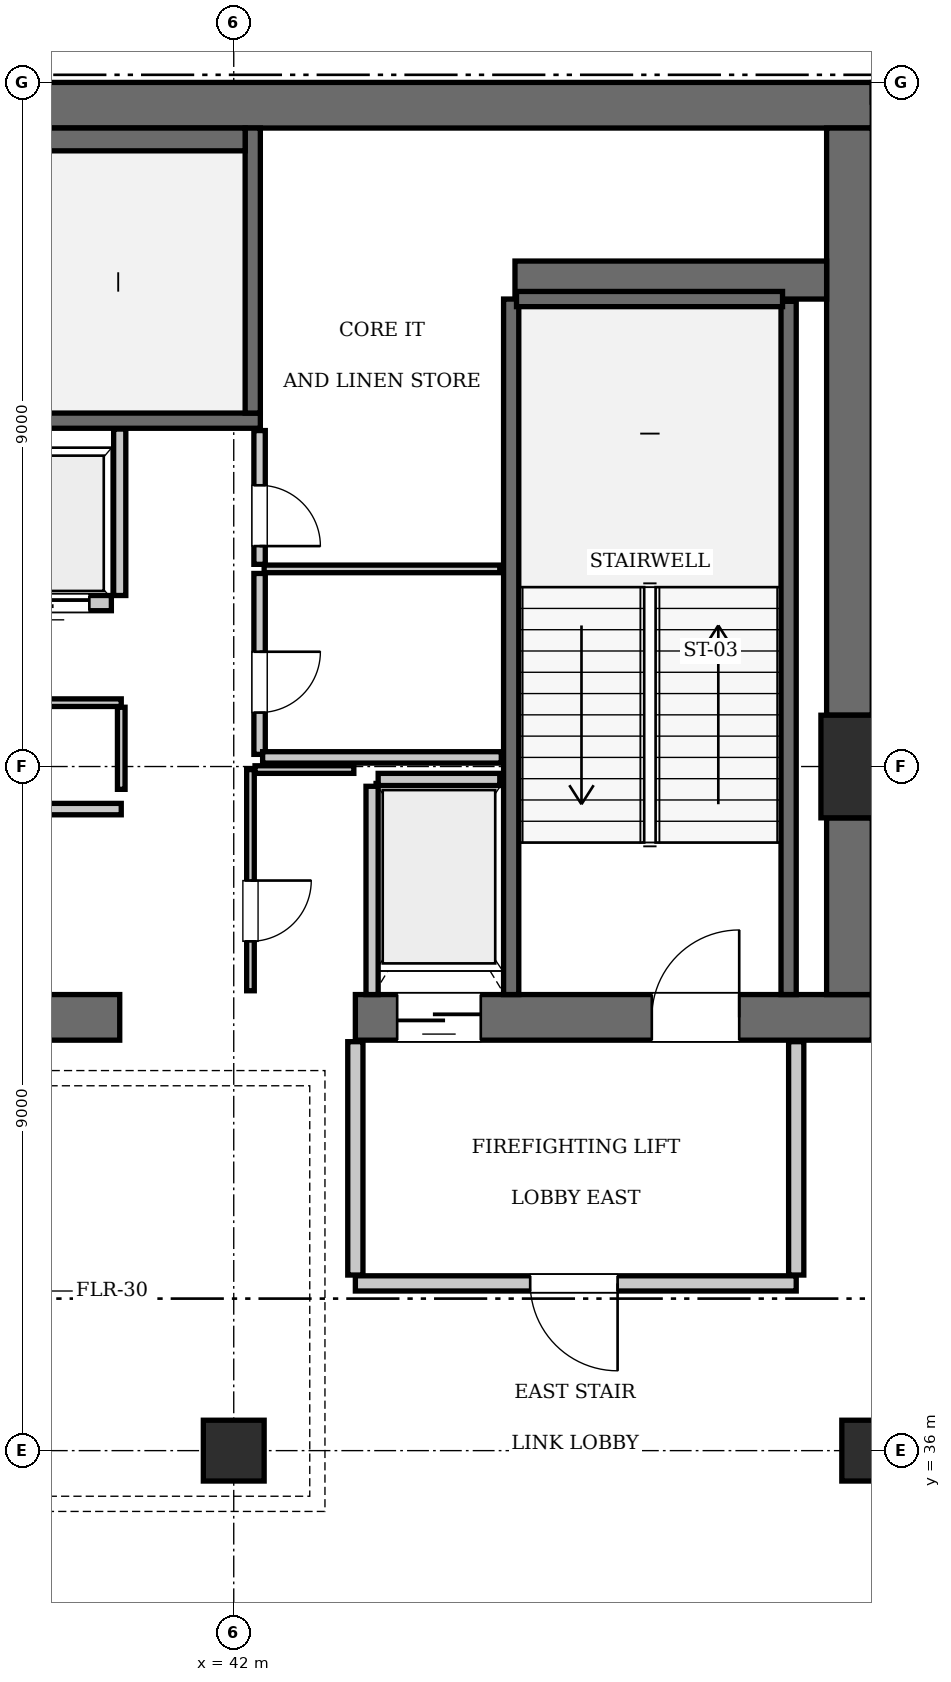
"""IFC4 building model, lengths in metres.
Left out: names, types, materials, properties, quantities, classifications, styles, units other than length and angle.
Written with IfcOpenShell. Run it as: python <this file> out.ifc"""

import sys

from ifc_helpers import new_model, si_unit, direction, frame, frame_2d, origin, origin_2d, place, context, subcontext, project, spatial, rectangle, extrude, element, fill, save


model = new_model("IFC4")
c1 = context("Model", 3, precision=1e-05, world=origin(), true_north=direction((0.0, 1.0)))
c2 = subcontext(c1, "Body", "Model", "MODEL_VIEW")
j1 = project(units=[si_unit("LENGTHUNIT", "METRE"), si_unit("PLANEANGLEUNIT", "RADIAN")], contexts=[c1])
p1 = place(None, origin())
s1 = spatial("IfcSite", under=j1, at=p1, CompositionType="ELEMENT")
p2 = place(p1, origin())
s2 = spatial("IfcBuilding", under=s1, at=p2, CompositionType="ELEMENT")
p3 = place(p2, frame((0.0, 0.0, 349.65)))
s3 = spatial("IfcBuildingStorey", under=s2, at=p3, CompositionType="ELEMENT", Elevation=349.65)
p4 = place(p3, frame((50.4, 45.0, 0.0), z_axis=(0.0, 0.0, 1.0), x_axis=(1.0, 0.0, 0.0)))
e1 = element("IfcColumn", 1, at=p4, inside=s3, PredefinedType="COLUMN", context=c2, shape_type="SweptSolid", body=[
    extrude(rectangle(XDim=1.35, YDim=1.35, at=origin_2d()), origin(), (0.0, 0.0, 1.0), 4.55),
])
p5 = place(p3, frame((25.2, 53.7, 0.0), z_axis=(0.0, 0.0, 1.0), x_axis=(1.0, 0.0, 0.0)))
e2 = element("IfcWall", 2, at=p5, inside=s3, PredefinedType="SHEAR", context=c2, shape_type="SweptSolid", body=[
    extrude(rectangle(XDim=25.2, YDim=0.6, at=frame_2d((12.6, 0.0))), origin(), (0.0, 0.0, 1.0), 4.55),
])
p6 = place(p3, frame((35.1, 41.7, 0.0), z_axis=(0.0, 0.0, 1.0), x_axis=(1.0, 0.0, 0.0)))
e3 = element("IfcWall", 3, at=p6, inside=s3, PredefinedType="SHEAR", context=c2, shape_type="SweptSolid", body=[
    extrude(rectangle(XDim=5.4, YDim=0.6, at=frame_2d((2.7, 0.0))), origin(), (0.0, 0.0, 1.0), 4.55),
])
p7 = place(p3, frame((43.6, 41.7, 0.0), z_axis=(0.0, 0.0, 1.0), x_axis=(1.0, 0.0, 0.0)))
e4 = element("IfcWall", 4, at=p7, inside=s3, PredefinedType="SHEAR", context=c2, shape_type="SweptSolid", body=[
    extrude(rectangle(XDim=6.8, YDim=0.6, at=frame_2d((3.4, 0.0))), origin(), (0.0, 0.0, 1.0), 4.55),
])
p8 = place(p7, frame((3.9, 0.0, 0.0)))
e5 = element("IfcOpeningElement", 5, at=p8, cuts=e4, PredefinedType="OPENING", context=c2, shape_type="SweptSolid", body=[
    extrude(rectangle(XDim=1.15, YDim=2.15, at=frame_2d((0.575, 1.075))), frame((0.0, 0.31, 0.0), z_axis=(0.0, -1.0, 0.0), x_axis=(1.0, 0.0, 0.0)), (0.0, 0.0, 1.0), 0.62),
])
p9 = place(p7, frame((0.55, 0.0, 0.0)))
e6 = element("IfcOpeningElement", 6, at=p9, cuts=e4, PredefinedType="OPENING", context=c2, shape_type="SweptSolid", body=[
    extrude(rectangle(XDim=1.1, YDim=2.2, at=frame_2d((0.55, 1.1))), frame((0.0, 0.31, 0.0), z_axis=(0.0, -1.0, 0.0), x_axis=(1.0, 0.0, 0.0)), (0.0, 0.0, 1.0), 0.62),
])
p10 = place(p3, frame((50.1, 42.0, 0.0), z_axis=(0.0, 0.0, 1.0), x_axis=(0.0, 1.0, 0.0)))
e7 = element("IfcWall", 7, at=p10, inside=s3, PredefinedType="SHEAR", context=c2, shape_type="SweptSolid", body=[
    extrude(rectangle(XDim=2.325, YDim=0.6, at=frame_2d((1.163, 0.0))), origin(), (0.0, 0.0, 1.0), 4.55),
])
p11 = place(p3, frame((50.1, 45.675, 0.0), z_axis=(0.0, 0.0, 1.0), x_axis=(0.0, 1.0, 0.0)))
e8 = element("IfcWall", 8, at=p11, inside=s3, PredefinedType="SHEAR", context=c2, shape_type="SweptSolid", body=[
    extrude(rectangle(XDim=7.725, YDim=0.6, at=frame_2d((3.862, 0.0))), origin(), (0.0, 0.0, 1.0), 4.55),
])
p12 = place(p3, frame((45.7, 51.4, 0.0), z_axis=(0.0, 0.0, 1.0), x_axis=(1.0, 0.0, 0.0)))
e9 = element("IfcWall", 9, at=p12, inside=s3, PredefinedType="SHEAR", context=c2, shape_type="SweptSolid", body=[
    extrude(rectangle(XDim=4.1, YDim=0.5, at=frame_2d((2.05, 0.0))), origin(), (0.0, 0.0, 1.0), 4.55),
])
for number, where, z_axis, x_axis in (
    (10, (42.0, 36.0, 0.0), (0.0, 0.0, 1.0), (1.0, 0.0, 0.0)),
    (11, (50.4, 36.0, 0.0), (0.0, 0.0, 1.0), (1.0, 0.0, 0.0)),
):
    element("IfcColumn", number, at=place(p3, frame(where, z_axis=z_axis, x_axis=x_axis)), inside=s3, PredefinedType="COLUMN", context=c2, shape_type="SweptSolid", body=[
        extrude(rectangle(XDim=0.8, YDim=0.8, at=origin_2d()), origin(), (0.0, 0.0, 1.0), 4.55),
    ])
p13 = place(p3, frame((33.25, 49.55, 0.0), z_axis=(0.0, 0.0, 1.0), x_axis=(1.0, 0.0, 0.0)))
e12 = element("IfcWall", 12, at=p13, inside=s3, PredefinedType="SOLIDWALL", context=c2, shape_type="SweptSolid", body=[
    extrude(rectangle(XDim=9.1, YDim=0.2, at=frame_2d((4.55, 0.0))), origin(), (0.0, 0.0, 1.0), 4.29),
])
p14 = place(p3, frame((42.25, 49.65, 0.0), z_axis=(0.0, 0.0, 1.0), x_axis=(0.0, 1.0, 0.0)))
e13 = element("IfcWall", 13, at=p14, inside=s3, PredefinedType="SOLIDWALL", context=c2, shape_type="SweptSolid", body=[
    extrude(rectangle(XDim=3.75, YDim=0.2, at=frame_2d((1.875, 0.0))), origin(), (0.0, 0.0, 1.0), 4.29),
])
p15 = place(p3, frame((33.45, 53.25, 0.0), z_axis=(0.0, 0.0, 1.0), x_axis=(1.0, 0.0, 0.0)))
e14 = element("IfcWall", 14, at=p15, inside=s3, PredefinedType="SOLIDWALL", context=c2, shape_type="SweptSolid", body=[
    extrude(rectangle(XDim=8.7, YDim=0.3, at=frame_2d((4.35, 0.0))), origin(), (0.0, 0.0, 1.0), 4.29),
])
p16 = place(p3, frame((45.65, 42.0, 0.0), z_axis=(0.0, 0.0, 1.0), x_axis=(0.0, 1.0, 0.0)))
e15 = element("IfcWall", 15, at=p16, inside=s3, PredefinedType="SOLIDWALL", context=c2, shape_type="SweptSolid", body=[
    extrude(rectangle(XDim=9.15, YDim=0.2, at=frame_2d((4.575, 0.0))), origin(), (0.0, 0.0, 1.0), 4.29),
])
p17 = place(p3, frame((49.3, 42.0, 0.0), z_axis=(0.0, 0.0, 1.0), x_axis=(0.0, 1.0, 0.0)))
e16 = element("IfcWall", 16, at=p17, inside=s3, PredefinedType="SOLIDWALL", context=c2, shape_type="SweptSolid", body=[
    extrude(rectangle(XDim=9.12, YDim=0.2, at=frame_2d((4.56, 0.0))), origin(), (0.0, 0.0, 1.0), 4.29),
])
p18 = place(p3, frame((45.72, 51.15, 0.0), z_axis=(0.0, 0.0, 1.0), x_axis=(1.0, 0.0, 0.0)))
e17 = element("IfcWall", 17, at=p18, inside=s3, PredefinedType="SOLIDWALL", context=c2, shape_type="SweptSolid", body=[
    extrude(rectangle(XDim=3.5, YDim=0.2, at=frame_2d((1.75, 0.0))), origin(), (0.0, 0.0, 1.0), 4.29),
])
p19 = place(p3, frame((38.71, 47.15, 0.0), z_axis=(0.0, 0.0, 1.0), x_axis=(1.0, 0.0, 0.0)))
e18 = element("IfcWall", 18, at=p19, inside=s3, PredefinedType="SOLIDWALL", context=c2, shape_type="SweptSolid", body=[
    extrude(rectangle(XDim=1.68, YDim=0.2, at=frame_2d((0.84, 0.0))), origin(), (0.0, 0.0, 1.0), 4.29),
])
p20 = place(p19, frame((0.29, 0.0, 0.0)))
e19 = element("IfcOpeningElement", 19, at=p20, cuts=e18, PredefinedType="OPENING", context=c2, shape_type="SweptSolid", body=[
    extrude(rectangle(XDim=1.1, YDim=2.2, at=frame_2d((0.55, 1.1))), frame((0.0, 0.11, 0.0), z_axis=(0.0, -1.0, 0.0), x_axis=(1.0, 0.0, 0.0)), (0.0, 0.0, 1.0), 0.22),
])
p21 = place(p3, frame((43.9, 44.83, 0.0), z_axis=(0.0, 0.0, 1.0), x_axis=(1.0, 0.0, 0.0)))
e20 = element("IfcWall", 20, at=p21, inside=s3, PredefinedType="SOLIDWALL", context=c2, shape_type="SweptSolid", body=[
    extrude(rectangle(XDim=1.6, YDim=0.16, at=frame_2d((0.8, 0.0))), origin(), (0.0, 0.0, 1.0), 4.29),
])
p22 = place(p3, frame((43.82, 42.0, 0.0), z_axis=(0.0, 0.0, 1.0), x_axis=(0.0, 1.0, 0.0)))
e21 = element("IfcWall", 21, at=p22, inside=s3, PredefinedType="SOLIDWALL", context=c2, shape_type="SweptSolid", body=[
    extrude(rectangle(XDim=2.74, YDim=0.16, at=frame_2d((1.37, 0.0))), origin(), (0.0, 0.0, 1.0), 4.29),
])
p23 = place(p3, frame((40.5, 47.25, 0.0), z_axis=(0.0, 0.0, 1.0), x_axis=(0.0, 1.0, 0.0)))
e22 = element("IfcWall", 22, at=p23, inside=s3, PredefinedType="SOLIDWALL", context=c2, shape_type="SweptSolid", body=[
    extrude(rectangle(XDim=2.19, YDim=0.16, at=frame_2d((1.095, 0.0))), origin(), (0.0, 0.0, 1.0), 4.29),
])
p24 = place(p3, frame((43.6, 38.2, 0.0), z_axis=(0.0, 0.0, 1.0), x_axis=(1.0, 0.0, 0.0)))
e23 = element("IfcWall", 23, at=p24, inside=s3, PredefinedType="PARTITIONING", context=c2, shape_type="SweptSolid", body=[
    extrude(rectangle(XDim=5.8, YDim=0.2, at=frame_2d((2.9, 0.0))), origin(), (0.0, 0.0, 1.0), 4.29),
])
p25 = place(p24, frame((2.3, 0.0, 0.0)))
e24 = element("IfcOpeningElement", 24, at=p25, cuts=e23, PredefinedType="OPENING", context=c2, shape_type="SweptSolid", body=[
    extrude(rectangle(XDim=1.15, YDim=2.15, at=frame_2d((0.575, 1.075))), frame((0.0, 0.11, 0.0), z_axis=(0.0, -1.0, 0.0), x_axis=(1.0, 0.0, 0.0)), (0.0, 0.0, 1.0), 0.22),
])
for number, where, z_axis, x_axis in (
    (25, (43.6, 38.31, 0.0), (0.0, 0.0, 1.0), (0.0, 1.0, 0.0)),
    (26, (49.4, 38.31, 0.0), (0.0, 0.0, 1.0), (0.0, 1.0, 0.0)),
):
    element("IfcWall", number, at=place(p3, frame(where, z_axis=z_axis, x_axis=x_axis)), inside=s3, PredefinedType="PARTITIONING", context=c2, shape_type="SweptSolid", body=[
        extrude(rectangle(XDim=3.07, YDim=0.2, at=frame_2d((1.535, 0.0))), origin(), (0.0, 0.0, 1.0), 4.29),
    ])
p26 = place(p3, frame((38.02, 45.84, 0.0), z_axis=(0.0, 0.0, 1.0), x_axis=(1.0, 0.0, 0.0)))
e27 = element("IfcWall", 27, at=p26, inside=s3, PredefinedType="PARTITIONING", context=c2, shape_type="SweptSolid", body=[
    extrude(rectangle(XDim=2.5, YDim=0.1, at=frame_2d((1.25, 0.0))), origin(), (0.0, 0.0, 1.0), 4.29),
])
p27 = place(p26, frame((0.75, 0.0, 0.0)))
e28 = element("IfcOpeningElement", 28, at=p27, cuts=e27, PredefinedType="OPENING", context=c2, shape_type="SweptSolid", body=[
    extrude(rectangle(XDim=0.8, YDim=2.05, at=frame_2d((0.4, 1.025))), frame((0.0, 0.06, 0.0), z_axis=(0.0, -1.0, 0.0), x_axis=(1.0, 0.0, 0.0)), (0.0, 0.0, 1.0), 0.12),
])
p28 = place(p3, frame((40.52, 44.7, 0.0), z_axis=(0.0, 0.0, 1.0), x_axis=(0.0, 1.0, 0.0)))
e29 = element("IfcWall", 29, at=p28, inside=s3, PredefinedType="PARTITIONING", context=c2, shape_type="SweptSolid", body=[
    extrude(rectangle(XDim=1.08, YDim=0.1, at=frame_2d((0.54, 0.0))), origin(), (0.0, 0.0, 1.0), 4.29),
])
p29 = place(p3, frame((42.22, 42.05, 0.0), z_axis=(0.0, 0.0, 1.0), x_axis=(0.0, 1.0, 0.0)))
e30 = element("IfcWall", 30, at=p29, inside=s3, PredefinedType="PARTITIONING", context=c2, shape_type="SweptSolid", body=[
    extrude(rectangle(XDim=2.91, YDim=0.1, at=frame_2d((1.455, 0.0))), origin(), (0.0, 0.0, 1.0), 4.29),
])
p30 = place(p29, frame((0.65, 0.0, 0.0)))
e31 = element("IfcOpeningElement", 31, at=p30, cuts=e30, PredefinedType="OPENING", context=c2, shape_type="SweptSolid", body=[
    extrude(rectangle(XDim=0.8, YDim=2.05, at=frame_2d((0.4, 1.025))), frame((0.0, 0.06, 0.0), z_axis=(0.0, -1.0, 0.0), x_axis=(1.0, 0.0, 0.0)), (0.0, 0.0, 1.0), 0.12),
])
p31 = place(p3, frame((42.28, 44.96, 0.0), z_axis=(0.0, 0.0, 1.0), x_axis=(1.0, 0.0, 0.0)))
e32 = element("IfcWall", 32, at=p31, inside=s3, PredefinedType="PARTITIONING", context=c2, shape_type="SweptSolid", body=[
    extrude(rectangle(XDim=1.3, YDim=0.1, at=frame_2d((0.65, 0.0))), origin(), (0.0, 0.0, 1.0), 4.29),
])
p32 = place(p3, frame((35.56, 44.44, 0.0), z_axis=(0.0, 0.0, 1.0), x_axis=(1.0, 0.0, 0.0)))
e33 = element("IfcWall", 33, at=p32, inside=s3, PredefinedType="PARTITIONING", context=c2, shape_type="SweptSolid", body=[
    extrude(rectangle(XDim=4.96, YDim=0.15, at=frame_2d((2.48, 0.0))), origin(), (0.0, 0.0, 1.0), 4.29),
])
p33 = place(p32, frame((1.32, 0.0, 0.0)))
e34 = element("IfcOpeningElement", 34, at=p33, cuts=e33, PredefinedType="OPENING", context=c2, shape_type="SweptSolid", body=[
    extrude(rectangle(XDim=0.9, YDim=2.1, at=frame_2d((0.45, 1.05))), frame((0.0, 0.085, 0.0), z_axis=(0.0, -1.0, 0.0), x_axis=(1.0, 0.0, 0.0)), (0.0, 0.0, 1.0), 0.17),
])
p34 = place(p3, frame((42.34, 45.16, 0.0), z_axis=(0.0, 0.0, 1.0), x_axis=(0.0, 1.0, 0.0)))
e35 = element("IfcWall", 35, at=p34, inside=s3, PredefinedType="PARTITIONING", context=c2, shape_type="SweptSolid", body=[
    extrude(rectangle(XDim=2.38, YDim=0.15, at=frame_2d((1.19, 0.0))), origin(), (0.0, 0.0, 1.0), 4.29),
])
p35 = place(p34, frame((0.55, 0.0, 0.0)))
e36 = element("IfcOpeningElement", 36, at=p35, cuts=e35, PredefinedType="OPENING", context=c2, shape_type="SweptSolid", body=[
    extrude(rectangle(XDim=0.8, YDim=2.05, at=frame_2d((0.4, 1.025))), frame((0.0, 0.085, 0.0), z_axis=(0.0, -1.0, 0.0), x_axis=(1.0, 0.0, 0.0)), (0.0, 0.0, 1.0), 0.17),
])
p36 = place(p3, frame((42.34, 47.66, 0.0), z_axis=(0.0, 0.0, 1.0), x_axis=(0.0, 1.0, 0.0)))
e37 = element("IfcWall", 37, at=p36, inside=s3, PredefinedType="PARTITIONING", context=c2, shape_type="SweptSolid", body=[
    extrude(rectangle(XDim=1.76, YDim=0.15, at=frame_2d((0.88, 0.0))), origin(), (0.0, 0.0, 1.0), 4.29),
])
p37 = place(p36, frame((0.24, 0.0, 0.0)))
e38 = element("IfcOpeningElement", 38, at=p37, cuts=e37, PredefinedType="OPENING", context=c2, shape_type="SweptSolid", body=[
    extrude(rectangle(XDim=0.8, YDim=2.05, at=frame_2d((0.4, 1.025))), frame((0.0, 0.085, 0.0), z_axis=(0.0, -1.0, 0.0), x_axis=(1.0, 0.0, 0.0)), (0.0, 0.0, 1.0), 0.17),
])
p38 = place(p3, frame((42.4, 47.6, 0.0), z_axis=(0.0, 0.0, 1.0), x_axis=(1.0, 0.0, 0.0)))
e39 = element("IfcWall", 39, at=p38, inside=s3, PredefinedType="PARTITIONING", context=c2, shape_type="SweptSolid", body=[
    extrude(rectangle(XDim=3.1, YDim=0.1, at=frame_2d((1.55, 0.0))), origin(), (0.0, 0.0, 1.0), 4.29),
])
p39 = place(p3, frame((42.38, 45.12, 0.0), z_axis=(0.0, 0.0, 1.0), x_axis=(1.0, 0.0, 0.0)))
e40 = element("IfcWall", 40, at=p39, inside=s3, PredefinedType="PARTITIONING", context=c2, shape_type="SweptSolid", body=[
    extrude(rectangle(XDim=3.14, YDim=0.15, at=frame_2d((1.57, 0.0))), origin(), (0.0, 0.0, 1.0), 4.29),
])
p40 = place(p8, origin())
e41 = element("IfcDoor", 41, at=p40, inside=s3, OperationType="SINGLE_SWING_RIGHT", PredefinedType="DOOR", context=c2, shape_type="SweptSolid", body=[
    extrude(rectangle(XDim=1.15, YDim=2.15, at=frame_2d((0.575, 1.075))), frame((0.0, 0.025, 0.0), z_axis=(0.0, -1.0, 0.0), x_axis=(1.0, 0.0, 0.0)), (0.0, 0.0, 1.0), 0.05),
])
fill(e5, e41)
p41 = place(p20, frame((1.1, 0.0, 0.0), z_axis=(0.0, 0.0, 1.0), x_axis=(-1.0, 0.0, 0.0)))
e42 = element("IfcDoor", 42, at=p41, inside=s3, OperationType="SLIDING_TO_RIGHT", PredefinedType="DOOR", context=c2, shape_type="SweptSolid", body=[
    extrude(rectangle(XDim=1.1, YDim=2.2, at=frame_2d((0.55, 1.1))), frame((0.0, 0.025, 0.0), z_axis=(0.0, -1.0, 0.0), x_axis=(1.0, 0.0, 0.0)), (0.0, 0.0, 1.0), 0.05),
])
fill(e19, e42)
p42 = place(p9, frame((1.1, 0.0, 0.0), z_axis=(0.0, 0.0, 1.0), x_axis=(-1.0, 0.0, 0.0)))
e43 = element("IfcDoor", 43, at=p42, inside=s3, OperationType="SLIDING_TO_LEFT", PredefinedType="DOOR", context=c2, shape_type="SweptSolid", body=[
    extrude(rectangle(XDim=1.1, YDim=2.2, at=frame_2d((0.55, 1.1))), frame((0.0, 0.025, 0.0), z_axis=(0.0, -1.0, 0.0), x_axis=(1.0, 0.0, 0.0)), (0.0, 0.0, 1.0), 0.05),
])
fill(e6, e43)
p43 = place(p25, frame((1.15, 0.0, 0.0), z_axis=(0.0, 0.0, 1.0), x_axis=(-1.0, 0.0, 0.0)))
e44 = element("IfcDoor", 44, at=p43, inside=s3, OperationType="SINGLE_SWING_LEFT", PredefinedType="DOOR", context=c2, shape_type="SweptSolid", body=[
    extrude(rectangle(XDim=1.15, YDim=2.15, at=frame_2d((0.575, 1.075))), frame((0.0, 0.025, 0.0), z_axis=(0.0, -1.0, 0.0), x_axis=(1.0, 0.0, 0.0)), (0.0, 0.0, 1.0), 0.05),
])
fill(e24, e44)
p44 = place(p30, frame((0.8, 0.0, 0.0), z_axis=(0.0, 0.0, 1.0), x_axis=(-1.0, 0.0, 0.0)))
e45 = element("IfcDoor", 45, at=p44, inside=s3, OperationType="SINGLE_SWING_LEFT", PredefinedType="DOOR", context=c2, shape_type="SweptSolid", body=[
    extrude(rectangle(XDim=0.8, YDim=2.05, at=frame_2d((0.4, 1.025))), frame((0.0, 0.025, 0.0), z_axis=(0.0, -1.0, 0.0), x_axis=(1.0, 0.0, 0.0)), (0.0, 0.0, 1.0), 0.05),
])
fill(e31, e45)
p45 = place(p35, frame((0.8, 0.0, 0.0), z_axis=(0.0, 0.0, 1.0), x_axis=(-1.0, 0.0, 0.0)))
e46 = element("IfcDoor", 46, at=p45, inside=s3, OperationType="SINGLE_SWING_LEFT", PredefinedType="DOOR", context=c2, shape_type="SweptSolid", body=[
    extrude(rectangle(XDim=0.8, YDim=2.05, at=frame_2d((0.4, 1.025))), frame((0.0, 0.025, 0.0), z_axis=(0.0, -1.0, 0.0), x_axis=(1.0, 0.0, 0.0)), (0.0, 0.0, 1.0), 0.05),
])
fill(e36, e46)
p46 = place(p37, frame((0.8, 0.0, 0.0), z_axis=(0.0, 0.0, 1.0), x_axis=(-1.0, 0.0, 0.0)))
e47 = element("IfcDoor", 47, at=p46, inside=s3, OperationType="SINGLE_SWING_RIGHT", PredefinedType="DOOR", context=c2, shape_type="SweptSolid", body=[
    extrude(rectangle(XDim=0.8, YDim=2.05, at=frame_2d((0.4, 1.025))), frame((0.0, 0.025, 0.0), z_axis=(0.0, -1.0, 0.0), x_axis=(1.0, 0.0, 0.0)), (0.0, 0.0, 1.0), 0.05),
])
fill(e38, e47)
save(model, sys.argv[1])
